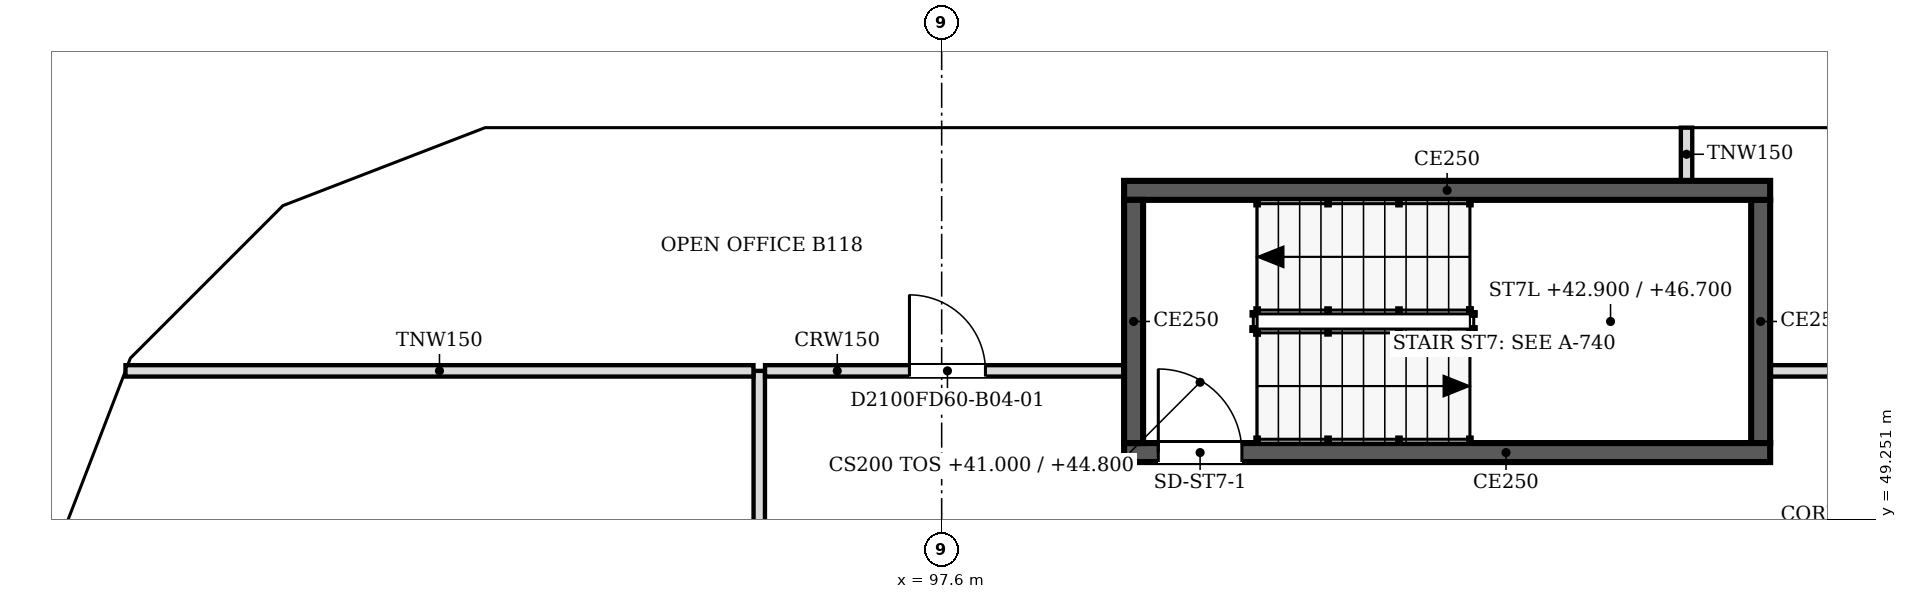
"""IFC4 building model, lengths in metres.
Left out: names, types, materials, properties, quantities, classifications, styles, units other than length and angle.
Written with IfcOpenShell. Run it as: python <this file> out.ifc"""

import sys

from ifc_helpers import new_model, si_unit, direction, frame, frame_2d, origin, place, context, subcontext, project, spatial, polyline, rectangle, outline, extrude, faceted_brep, source, transform, mapped, element, fill, save


model = new_model("IFC4")
c1 = context("Model", 3, precision=1e-05, world=origin(), true_north=direction((0.0, 1.0)))
c2 = subcontext(c1, "Body", "Model", "MODEL_VIEW")
j1 = project(units=[si_unit("LENGTHUNIT", "METRE"), si_unit("PLANEANGLEUNIT", "RADIAN")], contexts=[c1])
p1 = place(None, origin())
s1 = spatial("IfcSite", under=j1, at=p1, CompositionType="ELEMENT")
p2 = place(p1, origin())
s2 = spatial("IfcBuilding", under=s1, at=p2, CompositionType="ELEMENT")
p3 = place(p2, frame((0.0, 0.0, 41.0)))
s3 = spatial("IfcBuildingStorey", under=s2, at=p3, CompositionType="ELEMENT", Elevation=41.0)
m1 = source(origin(), c2, "Body", "SweptSolid", [
    extrude(outline(polyline([(3.05, 0.0), (6.1, 3.8), (3.05, 7.6), (0.0, 3.8), (3.05, 0.0)])), frame((0.0, 0.25, 0.0), z_axis=(0.0, -1.0, 0.0), x_axis=(1.0, 0.0, 0.0)), (0.0, 0.0, 1.0), 0.5),
])
p4 = place(p3, frame((112.85, 54.65, -3.8), z_axis=(0.0, 0.0, 1.0), x_axis=(-1.0, 0.0, 0.0)))
e1 = element("IfcWall", 1, at=p4, inside=s3, PredefinedType="SOLIDWALL", context=c2, shape_type="MappedRepresentation", body=[
    mapped(m1, transform((0.0, 0.0, 0.0), scale=1.0)),
])
m2 = source(origin(), c2, "Body", "SweptSolid", [
    extrude(outline(polyline([(3.05, 0.399), (5.78, 3.8), (3.05, 7.201), (0.321, 3.8), (3.05, 0.399)])), frame((0.0, 0.26, 0.0), z_axis=(0.0, -1.0, 0.0), x_axis=(1.0, 0.0, 0.0)), (0.0, 0.0, 1.0), 0.52),
])
p5 = place(p4, origin())
e2 = element("IfcOpeningElement", 2, at=p5, cuts=e1, PredefinedType="OPENING", context=c2, shape_type="MappedRepresentation", body=[
    mapped(m2, transform((0.0, 0.0, 0.0), scale=1.0)),
])
p6 = place(p3, frame((106.75, 54.65, -3.8), z_axis=(0.0, 0.0, 1.0), x_axis=(-1.0, 0.0, 0.0)))
e3 = element("IfcWall", 3, at=p6, inside=s3, PredefinedType="SOLIDWALL", context=c2, shape_type="MappedRepresentation", body=[
    mapped(m1, transform((0.0, 0.0, 0.0), scale=1.0)),
])
p7 = place(p6, origin())
e4 = element("IfcOpeningElement", 4, at=p7, cuts=e3, PredefinedType="OPENING", context=c2, shape_type="MappedRepresentation", body=[
    mapped(m2, transform((0.0, 0.0, 0.0), scale=1.0)),
])
m3 = source(origin(), c2, "Body", "Brep", [
    faceted_brep([(3.05, -0.25, 0.0), (6.1, -0.25, 3.8), (6.1, -0.25, 3.8), (3.05, -0.25, 7.6), (0.0, -0.25, 3.8), (0.0, 0.25, 3.8), (3.05, 0.25, 7.6), (6.1, 0.25, 3.8), (6.1, 0.25, 3.8), (3.05, 0.25, 0.0)], [[[0, 1, 2, 3, 4]], [[5, 6, 7, 8, 9]], [[9, 8, 1, 0]], [[7, 6, 3, 2]], [[6, 5, 4, 3]], [[5, 9, 0, 4]], [[1, 8, 7, 2]]]),
])
p8 = place(p3, frame((100.65, 54.65, -3.8), z_axis=(0.0, 0.0, 1.0), x_axis=(-1.0, 0.0, 0.0)))
e5 = element("IfcWall", 5, at=p8, inside=s3, PredefinedType="SOLIDWALL", context=c2, shape_type="MappedRepresentation", body=[
    mapped(m3, transform((0.0, 0.0, 0.0), scale=1.0)),
])
p9 = place(p8, origin())
e6 = element("IfcOpeningElement", 6, at=p9, cuts=e5, PredefinedType="OPENING", context=c2, shape_type="MappedRepresentation", body=[
    mapped(m2, transform((0.0, 0.0, 0.0), scale=1.0)),
])
m4 = source(origin(), c2, "Body", "Brep", [
    faceted_brep([(3.003, -0.25, 0.0), (3.05, -0.25, 0.06), (3.05, -0.25, 7.54), (3.003, -0.25, 7.6), (0.0, -0.25, 3.8), (0.0, 0.25, 3.8), (2.957, 0.25, 7.541), (2.957, 0.25, 0.059), (3.003, 0.0, 0.0), (3.003, 0.0, 7.6)], [[[0, 1, 2, 3, 4]], [[5, 6, 7]], [[1, 0, 8]], [[9, 3, 2]], [[6, 5, 4, 3, 9]], [[5, 7, 8, 0, 4]], [[1, 8, 7, 6, 9, 2]]]),
])
p10 = place(p3, frame((94.55, 54.65, -3.8), z_axis=(0.0, 0.0, 1.0), x_axis=(-1.0, 0.0, 0.0)))
e7 = element("IfcWall", 7, at=p10, inside=s3, PredefinedType="SOLIDWALL", context=c2, shape_type="MappedRepresentation", body=[
    mapped(m4, transform((0.0, 0.0, 0.0), scale=1.0)),
])
m5 = source(origin(), c2, "Body", "SweptSolid", [
    extrude(outline(polyline([(2.803, 6.944), (0.319, 3.8), (2.803, 0.656), (2.803, 6.944)])), frame((0.0, 0.26, 0.0), z_axis=(0.0, -1.0, 0.0), x_axis=(1.0, 0.0, 0.0)), (0.0, 0.0, 1.0), 0.52),
])
p11 = place(p10, origin())
e8 = element("IfcOpeningElement", 8, at=p11, cuts=e7, PredefinedType="OPENING", context=c2, shape_type="MappedRepresentation", body=[
    mapped(m5, transform((0.0, 0.0, 0.0), scale=1.0)),
])
m6 = source(origin(), c2, "Body", "Brep", [
    faceted_brep([(0.047, -0.25, 0.0), (2.997, -0.25, 3.8), (0.047, -0.25, 7.6), (0.0, -0.25, 7.541), (0.0, -0.25, 0.059), (0.093, 0.25, 7.54), (2.944, 0.25, 3.868), (2.944, 0.25, 3.732), (0.093, 0.25, 0.06), (2.997, 0.0, 3.8), (0.047, 0.0, 0.0), (0.047, 0.0, 7.6)], [[[0, 1, 2, 3, 4]], [[5, 6, 7, 8]], [[8, 7, 9, 1, 0, 10]], [[6, 5, 11, 2, 1, 9]], [[3, 2, 11]], [[10, 0, 4]], [[8, 10, 4, 3, 11, 5]], [[9, 7, 6]]]),
])
p12 = place(p3, frame((91.59, 54.667, -3.8), z_axis=(0.0, 0.0, 1.0), x_axis=(-0.933000876937, -0.359874094142, 0.0)))
e9 = element("IfcWall", 9, at=p12, inside=s3, PredefinedType="SOLIDWALL", context=c2, shape_type="MappedRepresentation", body=[
    mapped(m6, transform((0.0, 0.0, 0.0), scale=1.0)),
])
m7 = source(origin(), c2, "Body", "SweptSolid", [
    extrude(outline(polyline([(0.247, 0.665), (2.681, 3.8), (0.247, 6.935), (0.247, 0.665)])), frame((0.0, 0.26, 0.0), z_axis=(0.0, -1.0, 0.0), x_axis=(1.0, 0.0, 0.0)), (0.0, 0.0, 1.0), 0.52),
])
p13 = place(p12, origin())
e10 = element("IfcOpeningElement", 10, at=p13, cuts=e9, PredefinedType="OPENING", context=c2, shape_type="MappedRepresentation", body=[
    mapped(m7, transform((0.0, 0.0, 0.0), scale=1.0)),
])
m8 = source(origin(), c2, "Body", "Brep", [
    faceted_brep([(2.944, -0.25, 0.0), (2.997, -0.25, 0.068), (2.997, -0.25, 7.532), (2.944, -0.25, 7.6), (0.0, -0.25, 3.8), (0.053, 0.25, 3.868), (2.891, 0.25, 7.532), (2.891, 0.25, 0.068), (0.053, 0.25, 3.732), (2.944, 0.0, 0.0), (2.944, 0.0, 7.6), (0.0, 0.0, 3.8)], [[[0, 1, 2, 3, 4]], [[5, 6, 7, 8]], [[1, 0, 9]], [[10, 3, 2]], [[6, 5, 11, 4, 3, 10]], [[8, 7, 9, 0, 4, 11]], [[8, 11, 5]], [[1, 9, 7, 6, 10, 2]]]),
])
p14 = place(p3, frame((88.794, 53.588, -3.8), z_axis=(0.0, 0.0, 1.0), x_axis=(-0.707066050402, -0.707147509625, 0.0)))
e11 = element("IfcWall", 11, at=p14, inside=s3, PredefinedType="SOLIDWALL", context=c2, shape_type="MappedRepresentation", body=[
    mapped(m8, transform((0.0, 0.0, 0.0), scale=1.0)),
])
m9 = source(origin(), c2, "Body", "SweptSolid", [
    extrude(outline(polyline([(2.744, 6.934), (0.316, 3.8), (2.744, 0.666), (2.744, 6.934)])), frame((0.0, 0.26, 0.0), z_axis=(0.0, -1.0, 0.0), x_axis=(1.0, 0.0, 0.0)), (0.0, 0.0, 1.0), 0.52),
])
p15 = place(p14, origin())
e12 = element("IfcOpeningElement", 12, at=p15, cuts=e11, PredefinedType="OPENING", context=c2, shape_type="MappedRepresentation", body=[
    mapped(m9, transform((0.0, 0.0, 0.0), scale=1.0)),
])
m10 = source(origin(), c2, "Body", "Brep", [
    faceted_brep([(0.053, -0.25, 0.0), (3.003, -0.25, 3.8), (0.053, -0.25, 7.6), (0.0, -0.25, 7.532), (0.0, -0.25, 0.068), (0.106, 0.25, 7.532), (2.957, 0.25, 3.86), (2.957, 0.25, 3.74), (0.106, 0.25, 0.068), (3.003, 0.0, 3.8), (0.053, 0.0, 0.0), (0.053, 0.0, 7.6)], [[[0, 1, 2, 3, 4]], [[5, 6, 7, 8]], [[8, 7, 9, 1, 0, 10]], [[6, 5, 11, 2, 1, 9]], [[3, 2, 11]], [[10, 0, 4]], [[8, 10, 4, 3, 11, 5]], [[9, 7, 6]]]),
])
p16 = place(p3, frame((86.731, 51.556, -3.8), z_axis=(0.0, 0.0, 1.0), x_axis=(-0.359855894603, -0.933007896601, 0.0)))
e13 = element("IfcWall", 13, at=p16, inside=s3, PredefinedType="SOLIDWALL", context=c2, shape_type="MappedRepresentation", body=[
    mapped(m10, transform((0.0, 0.0, 0.0), scale=1.0)),
])
m11 = source(origin(), c2, "Body", "SweptSolid", [
    extrude(outline(polyline([(0.253, 0.665), (2.687, 3.8), (0.253, 6.935), (0.253, 0.665)])), frame((0.0, 0.26, 0.0), z_axis=(0.0, -1.0, 0.0), x_axis=(1.0, 0.0, 0.0)), (0.0, 0.0, 1.0), 0.52),
])
p17 = place(p16, origin())
e14 = element("IfcOpeningElement", 14, at=p17, cuts=e13, PredefinedType="OPENING", context=c2, shape_type="MappedRepresentation", body=[
    mapped(m11, transform((0.0, 0.0, 0.0), scale=1.0)),
])
p18 = place(p2, frame((0.0, 0.0, 44.8)))
s4 = spatial("IfcBuildingStorey", under=s2, at=p18, CompositionType="ELEMENT", Elevation=44.8)
p19 = place(p18, frame((109.8, 54.65, -3.8), z_axis=(0.0, 0.0, 1.0), x_axis=(-1.0, 0.0, 0.0)))
e15 = element("IfcWall", 15, at=p19, inside=s4, PredefinedType="SOLIDWALL", context=c2, shape_type="MappedRepresentation", body=[
    mapped(m1, transform((0.0, 0.0, 0.0), scale=1.0)),
])
p20 = place(p19, origin())
e16 = element("IfcOpeningElement", 16, at=p20, cuts=e15, PredefinedType="OPENING", context=c2, shape_type="MappedRepresentation", body=[
    mapped(m2, transform((0.0, 0.0, 0.0), scale=1.0)),
])
p21 = place(p18, frame((103.7, 54.65, -3.8), z_axis=(0.0, 0.0, 1.0), x_axis=(-1.0, 0.0, 0.0)))
e17 = element("IfcWall", 17, at=p21, inside=s4, PredefinedType="SOLIDWALL", context=c2, shape_type="MappedRepresentation", body=[
    mapped(m3, transform((0.0, 0.0, 0.0), scale=1.0)),
])
p22 = place(p21, origin())
e18 = element("IfcOpeningElement", 18, at=p22, cuts=e17, PredefinedType="OPENING", context=c2, shape_type="MappedRepresentation", body=[
    mapped(m2, transform((0.0, 0.0, 0.0), scale=1.0)),
])
m12 = source(origin(), c2, "Body", "Brep", [
    faceted_brep([(3.05, -0.25, 0.0), (6.053, -0.25, 3.8), (3.05, -0.25, 7.6), (0.0, -0.25, 3.8), (0.0, 0.25, 3.8), (3.05, 0.25, 7.6), (6.007, 0.25, 3.859), (6.007, 0.25, 3.741), (3.05, 0.25, 0.0), (6.053, 0.0, 3.8)], [[[0, 1, 2, 3]], [[4, 5, 6, 7, 8]], [[8, 7, 9, 1, 0]], [[6, 5, 2, 1, 9]], [[5, 4, 3, 2]], [[4, 8, 0, 3]], [[9, 7, 6]]]),
])
p23 = place(p18, frame((97.6, 54.65, -3.8), z_axis=(0.0, 0.0, 1.0), x_axis=(-1.0, 0.0, 0.0)))
e19 = element("IfcWall", 19, at=p23, inside=s4, PredefinedType="SOLIDWALL", context=c2, shape_type="MappedRepresentation", body=[
    mapped(m12, transform((0.0, 0.0, 0.0), scale=1.0)),
])
m13 = source(origin(), c2, "Body", "SweptSolid", [
    extrude(outline(polyline([(3.049, 0.401), (5.735, 3.8), (3.049, 7.199), (0.321, 3.8), (3.049, 0.401)])), frame((0.0, 0.26, 0.0), z_axis=(0.0, -1.0, 0.0), x_axis=(1.0, 0.0, 0.0)), (0.0, 0.0, 1.0), 0.52),
])
p24 = place(p23, origin())
e20 = element("IfcOpeningElement", 20, at=p24, cuts=e19, PredefinedType="OPENING", context=c2, shape_type="MappedRepresentation", body=[
    mapped(m13, transform((0.0, 0.0, 0.0), scale=1.0)),
])
m14 = source(origin(), c2, "Body", "Brep", [
    faceted_brep([(2.95, -0.25, 0.0), (3.003, -0.25, 0.068), (3.003, -0.25, 7.532), (2.95, -0.25, 7.6), (0.0, -0.25, 3.8), (0.047, 0.25, 3.86), (2.898, 0.25, 7.532), (2.898, 0.25, 0.068), (0.047, 0.25, 3.74), (2.95, 0.0, 0.0), (2.95, 0.0, 7.6), (0.0, 0.0, 3.8)], [[[0, 1, 2, 3, 4]], [[5, 6, 7, 8]], [[1, 0, 9]], [[10, 3, 2]], [[6, 5, 11, 4, 3, 10]], [[8, 7, 9, 0, 4, 11]], [[8, 11, 5]], [[1, 9, 7, 6, 10, 2]]]),
])
p25 = place(p18, frame((91.547, 54.65, -3.8), z_axis=(0.0, 0.0, 1.0), x_axis=(-0.933007896601, -0.359855894603, 0.0)))
e21 = element("IfcWall", 21, at=p25, inside=s4, PredefinedType="SOLIDWALL", context=c2, shape_type="MappedRepresentation", body=[
    mapped(m14, transform((0.0, 0.0, 0.0), scale=1.0)),
])
m15 = source(origin(), c2, "Body", "SweptSolid", [
    extrude(outline(polyline([(2.75, 6.935), (0.316, 3.8), (2.75, 0.665), (2.75, 6.935)])), frame((0.0, 0.26, 0.0), z_axis=(0.0, -1.0, 0.0), x_axis=(1.0, 0.0, 0.0)), (0.0, 0.0, 1.0), 0.52),
])
p26 = place(p25, origin())
e22 = element("IfcOpeningElement", 22, at=p26, cuts=e21, PredefinedType="OPENING", context=c2, shape_type="MappedRepresentation", body=[
    mapped(m15, transform((0.0, 0.0, 0.0), scale=1.0)),
])
m16 = source(origin(), c2, "Body", "Brep", [
    faceted_brep([(0.053, -0.25, 0.0), (2.997, -0.25, 3.8), (0.053, -0.25, 7.6), (0.0, -0.25, 7.532), (0.0, -0.25, 0.068), (0.106, 0.25, 7.532), (2.944, 0.25, 3.868), (2.944, 0.25, 3.732), (0.106, 0.25, 0.068), (2.997, 0.0, 3.8), (0.053, 0.0, 0.0), (0.053, 0.0, 7.6)], [[[0, 1, 2, 3, 4]], [[5, 6, 7, 8]], [[8, 7, 9, 1, 0, 10]], [[6, 5, 11, 2, 1, 9]], [[3, 2, 11]], [[10, 0, 4]], [[8, 10, 4, 3, 11, 5]], [[9, 7, 6]]]),
])
p27 = place(p18, frame((88.831, 53.625, -3.8), z_axis=(0.0, 0.0, 1.0), x_axis=(-0.707147509625, -0.707066050402, 0.0)))
e23 = element("IfcWall", 23, at=p27, inside=s4, PredefinedType="SOLIDWALL", context=c2, shape_type="MappedRepresentation", body=[
    mapped(m16, transform((0.0, 0.0, 0.0), scale=1.0)),
])
m17 = source(origin(), c2, "Body", "SweptSolid", [
    extrude(outline(polyline([(0.253, 0.666), (2.681, 3.8), (0.253, 6.934), (0.253, 0.666)])), frame((0.0, 0.26, 0.0), z_axis=(0.0, -1.0, 0.0), x_axis=(1.0, 0.0, 0.0)), (0.0, 0.0, 1.0), 0.52),
])
p28 = place(p27, origin())
e24 = element("IfcOpeningElement", 24, at=p28, cuts=e23, PredefinedType="OPENING", context=c2, shape_type="MappedRepresentation", body=[
    mapped(m17, transform((0.0, 0.0, 0.0), scale=1.0)),
])
m18 = source(origin(), c2, "Body", "Brep", [
    faceted_brep([(2.95, -0.25, 0.0), (2.997, -0.25, 0.059), (2.997, -0.25, 7.541), (2.95, -0.25, 7.6), (0.0, -0.25, 3.8), (0.053, 0.25, 3.868), (2.904, 0.25, 7.54), (2.904, 0.25, 0.06), (0.053, 0.25, 3.732), (2.95, 0.0, 0.0), (2.95, 0.0, 7.6), (0.0, 0.0, 3.8)], [[[0, 1, 2, 3, 4]], [[5, 6, 7, 8]], [[1, 0, 9]], [[10, 3, 2]], [[6, 5, 11, 4, 3, 10]], [[8, 7, 9, 0, 4, 11]], [[8, 11, 5]], [[1, 9, 7, 6, 10, 2]]]),
])
p29 = place(p18, frame((86.712, 51.506, -3.8), z_axis=(0.0, 0.0, 1.0), x_axis=(-0.359874094142, -0.933000876937, 0.0)))
e25 = element("IfcWall", 25, at=p29, inside=s4, PredefinedType="SOLIDWALL", context=c2, shape_type="MappedRepresentation", body=[
    mapped(m18, transform((0.0, 0.0, 0.0), scale=1.0)),
])
p30 = place(p29, origin())
e26 = element("IfcOpeningElement", 26, at=p30, cuts=e25, PredefinedType="OPENING", context=c2, shape_type="MappedRepresentation", body=[
    mapped(m15, transform((0.0, 0.0, 0.0), scale=1.0)),
])
p31 = place(p3, frame((108.5, 50.125, 0.0), z_axis=(0.0, 0.0, 1.0), x_axis=(-1.0, 0.0, 0.0)))
e27 = element("IfcWall", 27, at=p31, inside=s3, PredefinedType="SOLIDWALL", context=c2, shape_type="SweptSolid", body=[
    extrude(rectangle(XDim=8.5, YDim=0.25, at=frame_2d((4.25, 0.0))), origin(), (0.0, 0.0, 1.0), 3.8),
])
m19 = source(origin(), c2, "Body", "SweptSolid", [
    extrude(rectangle(XDim=1.1, YDim=2.1, at=frame_2d((0.55, 1.05))), frame((0.0, 0.135, 0.0), z_axis=(0.0, -1.0, 0.0), x_axis=(1.0, 0.0, 0.0)), (0.0, 0.0, 1.0), 0.27),
])
p32 = place(p31, frame((6.95, 0.0, 0.0)))
e28 = element("IfcOpeningElement", 28, at=p32, cuts=e27, PredefinedType="OPENING", context=c2, shape_type="MappedRepresentation", body=[
    mapped(m19, transform((0.0, 0.0, 0.0), scale=1.0)),
])
p33 = place(p3, frame((100.125, 50.25, 0.0), z_axis=(0.0, 0.0, 1.0), x_axis=(0.0, 1.0, 0.0)))
e29 = element("IfcWall", 29, at=p33, inside=s3, PredefinedType="SOLIDWALL", context=c2, shape_type="SweptSolid", body=[
    extrude(rectangle(XDim=3.2, YDim=0.25, at=frame_2d((1.6, 0.0))), origin(), (0.0, 0.0, 1.0), 3.8),
])
p34 = place(p3, frame((100.0, 53.575, 0.0), z_axis=(0.0, 0.0, 1.0), x_axis=(1.0, 0.0, 0.0)))
e30 = element("IfcWall", 30, at=p34, inside=s3, PredefinedType="SOLIDWALL", context=c2, shape_type="SweptSolid", body=[
    extrude(rectangle(XDim=8.5, YDim=0.25, at=frame_2d((4.25, 0.0))), origin(), (0.0, 0.0, 1.0), 3.8),
])
p35 = place(p3, frame((108.375, 53.45, 0.0), z_axis=(0.0, 0.0, 1.0), x_axis=(0.0, -1.0, 0.0)))
e31 = element("IfcWall", 31, at=p35, inside=s3, PredefinedType="SOLIDWALL", context=c2, shape_type="SweptSolid", body=[
    extrude(rectangle(XDim=3.2, YDim=0.25, at=frame_2d((1.6, 0.0))), origin(), (0.0, 0.0, 1.0), 3.8),
])
p36 = place(p3, frame((95.2, 36.676, 0.0), z_axis=(0.0, 0.0, 1.0), x_axis=(0.0, 1.0, 0.0)))
e32 = element("IfcWall", 32, at=p36, inside=s3, PredefinedType="PARTITIONING", context=c2, shape_type="SweptSolid", body=[
    extrude(rectangle(XDim=14.524, YDim=0.15, at=frame_2d((7.262, 0.0))), origin(), (0.0, 0.0, 1.0), 3.067),
])
m20 = source(origin(), c2, "Body", "SweptSolid", [
    extrude(rectangle(XDim=1.0, YDim=2.1, at=frame_2d((0.5, 1.05))), frame((0.0, 0.085, 0.0), z_axis=(0.0, -1.0, 0.0), x_axis=(1.0, 0.0, 0.0)), (0.0, 0.0, 1.0), 0.17),
])
p37 = place(p36, frame((11.225, 0.0, 0.0)))
e33 = element("IfcOpeningElement", 33, at=p37, cuts=e32, PredefinedType="OPENING", context=c2, shape_type="MappedRepresentation", body=[
    mapped(m20, transform((0.0, 0.0, 0.0), scale=1.0)),
])
p38 = place(p36, frame((4.0, 0.0, 0.0)))
e34 = element("IfcOpeningElement", 34, at=p38, cuts=e32, PredefinedType="OPENING", context=c2, shape_type="MappedRepresentation", body=[
    mapped(m20, transform((0.0, 0.0, 0.0), scale=1.0)),
])
p39 = place(p3, frame((86.862, 51.2, 0.0), z_axis=(0.0, 0.0, 1.0), x_axis=(1.0, 0.0, 0.0)))
e35 = element("IfcWall", 35, at=p39, inside=s3, PredefinedType="PARTITIONING", context=c2, shape_type="SweptSolid", body=[
    extrude(rectangle(XDim=8.262, YDim=0.15, at=frame_2d((4.131, 0.0))), origin(), (0.0, 0.0, 1.0), 3.067),
])
p40 = place(p3, frame((95.276, 51.2, 0.0), z_axis=(0.0, 0.0, 1.0), x_axis=(1.0, 0.0, 0.0)))
e36 = element("IfcWall", 36, at=p40, inside=s3, PredefinedType="PARTITIONING", context=c2, shape_type="SweptSolid", body=[
    extrude(rectangle(XDim=4.724, YDim=0.15, at=frame_2d((2.362, 0.0))), origin(), (0.0, 0.0, 1.0), 3.067),
])
p41 = place(p40, frame((1.9, 0.0, 0.0)))
e37 = element("IfcOpeningElement", 37, at=p41, cuts=e36, PredefinedType="OPENING", context=c2, shape_type="MappedRepresentation", body=[
    mapped(m20, transform((0.0, 0.0, 0.0), scale=1.0)),
])
p42 = place(p3, frame((108.5, 51.2, 0.0), z_axis=(0.0, 0.0, 1.0), x_axis=(1.0, 0.0, 0.0)))
e38 = element("IfcWall", 38, at=p42, inside=s3, PredefinedType="PARTITIONING", context=c2, shape_type="SweptSolid", body=[
    extrude(rectangle(XDim=15.9, YDim=0.15, at=frame_2d((7.95, 0.0))), origin(), (0.0, 0.0, 1.0), 3.067),
])
m21 = source(origin(), c2, "Body", "SweptSolid", [
    extrude(rectangle(XDim=0.9, YDim=2.1, at=frame_2d((0.45, 1.05))), frame((0.0, 0.085, 0.0), z_axis=(0.0, -1.0, 0.0), x_axis=(1.0, 0.0, 0.0)), (0.0, 0.0, 1.0), 0.17),
])
p43 = place(p42, frame((7.5, 0.0, 0.0)))
e39 = element("IfcOpeningElement", 39, at=p43, cuts=e38, PredefinedType="OPENING", context=c2, shape_type="MappedRepresentation", body=[
    mapped(m21, transform((0.0, 0.0, 0.0), scale=1.0)),
])
p44 = place(p3, frame((107.4, 53.7, 0.0), z_axis=(0.0, 0.0, 1.0), x_axis=(0.0, 1.0, 0.0)))
e40 = element("IfcWall", 40, at=p44, inside=s3, PredefinedType="PARTITIONING", context=c2, shape_type="SweptSolid", body=[
    extrude(rectangle(XDim=0.7, YDim=0.15, at=frame_2d((0.35, 0.0))), origin(), (0.0, 0.0, 1.0), 3.067),
])
m22 = source(origin(), c2, "Body", "SweptSolid", [
    extrude(rectangle(XDim=1.1, YDim=2.1, at=frame_2d((0.55, 1.05))), frame((0.0, 0.025, 0.0), z_axis=(0.0, -1.0, 0.0), x_axis=(1.0, 0.0, 0.0)), (0.0, 0.0, 1.0), 0.05),
])
p45 = place(p32, origin())
e41 = element("IfcDoor", 41, at=p45, inside=s3, OperationType="SINGLE_SWING_RIGHT", PredefinedType="DOOR", context=c2, shape_type="MappedRepresentation", body=[
    mapped(m22, transform((0.0, 0.0, 0.0), scale=1.0)),
])
fill(e28, e41)
m23 = source(origin(), c2, "Body", "SweptSolid", [
    extrude(rectangle(XDim=1.0, YDim=2.1, at=frame_2d((0.5, 1.05))), frame((0.0, 0.025, 0.0), z_axis=(0.0, -1.0, 0.0), x_axis=(1.0, 0.0, 0.0)), (0.0, 0.0, 1.0), 0.05),
])
p46 = place(p41, origin())
e42 = element("IfcDoor", 42, at=p46, inside=s3, OperationType="SINGLE_SWING_LEFT", PredefinedType="DOOR", context=c2, shape_type="MappedRepresentation", body=[
    mapped(m23, transform((0.0, 0.0, 0.0), scale=1.0)),
])
fill(e37, e42)
save(model, sys.argv[1])
